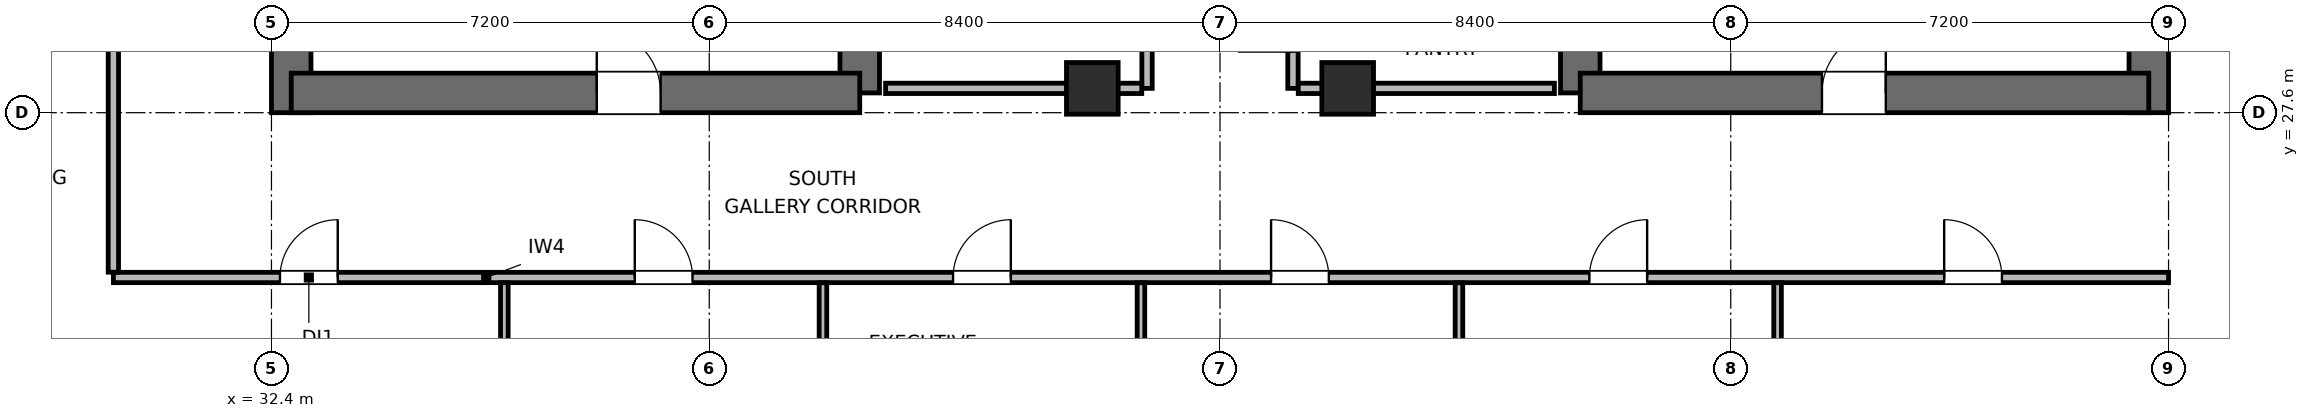
"""IFC4 building model, lengths in metres.
Left out: names, types, materials, properties, quantities, classifications, styles, units other than length and angle.
Written with IfcOpenShell. Run it as: python <this file> out.ifc"""

import sys

from ifc_helpers import new_model, si_unit, direction, frame, frame_2d, origin, origin_2d, place, context, subcontext, project, spatial, rectangle, extrude, element, fill, save


model = new_model("IFC4")
c1 = context("Model", 3, precision=1e-05, world=origin(), true_north=direction((0.0, 1.0)))
c2 = subcontext(c1, "Body", "Model", "MODEL_VIEW")
j1 = project(units=[si_unit("LENGTHUNIT", "METRE"), si_unit("PLANEANGLEUNIT", "RADIAN")], contexts=[c1])
p1 = place(None, origin())
s1 = spatial("IfcSite", under=j1, at=p1, CompositionType="ELEMENT")
p2 = place(p1, origin())
s2 = spatial("IfcBuilding", under=s1, at=p2, CompositionType="ELEMENT")
p3 = place(p2, frame((0.0, 0.0, 214.8)))
s3 = spatial("IfcBuildingStorey", under=s2, at=p3, CompositionType="ELEMENT", Elevation=214.8)
p4 = place(p3, frame((32.725, 27.6, 0.0), z_axis=(0.0, 0.0, 1.0), x_axis=(0.0, 1.0, 0.0)))
e1 = element("IfcWall", 1, at=p4, inside=s3, PredefinedType="SHEAR", context=c2, shape_type="SweptSolid", body=[
    extrude(rectangle(XDim=16.8, YDim=0.65, at=frame_2d((8.4, 0.0))), origin(), (0.0, 0.0, 1.0), 4.5),
])
p5 = place(p3, frame((42.075, 27.925, 0.0), z_axis=(0.0, 0.0, 1.0), x_axis=(0.0, 1.0, 0.0)))
e2 = element("IfcWall", 2, at=p5, inside=s3, PredefinedType="SHEAR", context=c2, shape_type="SweptSolid", body=[
    extrude(rectangle(XDim=6.475, YDim=0.65, at=frame_2d((3.237, 0.0))), origin(), (0.0, 0.0, 1.0), 4.5),
])
p6 = place(p3, frame((32.725, 27.925, 0.0), z_axis=(0.0, 0.0, 1.0), x_axis=(1.0, 0.0, 0.0)))
e3 = element("IfcWall", 3, at=p6, inside=s3, PredefinedType="SHEAR", context=c2, shape_type="SweptSolid", body=[
    extrude(rectangle(XDim=9.35, YDim=0.65, at=frame_2d((4.675, 0.0))), origin(), (0.0, 0.0, 1.0), 4.5),
])
p7 = place(p6, frame((5.025, 0.0, 0.0)))
e4 = element("IfcOpeningElement", 4, at=p7, cuts=e3, PredefinedType="OPENING", context=c2, shape_type="SweptSolid", body=[
    extrude(rectangle(XDim=1.05, YDim=2.04, at=frame_2d((0.525, 1.02))), frame((0.0, 0.335, 0.0), z_axis=(0.0, -1.0, 0.0), x_axis=(1.0, 0.0, 0.0)), (0.0, 0.0, 1.0), 0.67),
])
p8 = place(p3, frame((53.925, 27.925, 0.0), z_axis=(0.0, 0.0, 1.0), x_axis=(0.0, 1.0, 0.0)))
e5 = element("IfcWall", 5, at=p8, inside=s3, PredefinedType="SHEAR", context=c2, shape_type="SweptSolid", body=[
    extrude(rectangle(XDim=7.875, YDim=0.65, at=frame_2d((3.938, 0.0))), origin(), (0.0, 0.0, 1.0), 4.5),
])
p9 = place(p3, frame((63.275, 27.6, 0.0), z_axis=(0.0, 0.0, 1.0), x_axis=(0.0, 1.0, 0.0)))
e6 = element("IfcWall", 6, at=p9, inside=s3, PredefinedType="SHEAR", context=c2, shape_type="SweptSolid", body=[
    extrude(rectangle(XDim=16.8, YDim=0.65, at=frame_2d((8.4, 0.0))), origin(), (0.0, 0.0, 1.0), 4.5),
])
p10 = place(p3, frame((53.925, 27.925, 0.0), z_axis=(0.0, 0.0, 1.0), x_axis=(1.0, 0.0, 0.0)))
e7 = element("IfcWall", 7, at=p10, inside=s3, PredefinedType="SHEAR", context=c2, shape_type="SweptSolid", body=[
    extrude(rectangle(XDim=9.35, YDim=0.65, at=frame_2d((4.675, 0.0))), origin(), (0.0, 0.0, 1.0), 4.5),
])
p11 = place(p10, frame((3.975, 0.0, 0.0)))
e8 = element("IfcOpeningElement", 8, at=p11, cuts=e7, PredefinedType="OPENING", context=c2, shape_type="SweptSolid", body=[
    extrude(rectangle(XDim=1.05, YDim=2.04, at=frame_2d((0.525, 1.02))), frame((0.0, 0.335, 0.0), z_axis=(0.0, -1.0, 0.0), x_axis=(1.0, 0.0, 0.0)), (0.0, 0.0, 1.0), 0.67),
])
for number, where, z_axis, x_axis in (
    (9, (45.9, 28.0, 0.0), (0.0, 0.0, 1.0), (1.0, 0.0, 0.0)),
    (10, (50.1, 28.0, 0.0), (0.0, 0.0, 1.0), (1.0, 0.0, 0.0)),
):
    element("IfcColumn", number, at=place(p3, frame(where, z_axis=z_axis, x_axis=x_axis)), inside=s3, PredefinedType="COLUMN", context=c2, shape_type="SweptSolid", body=[
        extrude(rectangle(XDim=0.85, YDim=0.85, at=origin_2d()), origin(), (0.0, 0.0, 1.0), 4.5),
    ])
p12 = place(p3, frame((46.8, 28.0, 0.0), z_axis=(0.0, 0.0, 1.0), x_axis=(0.0, 1.0, 0.0)))
e11 = element("IfcWall", 11, at=p12, inside=s3, PredefinedType="PARTITIONING", context=c2, shape_type="SweptSolid", body=[
    extrude(rectangle(XDim=4.5, YDim=0.17, at=frame_2d((2.25, 0.0))), origin(), (0.0, 0.0, 1.0), 4.28),
])
p13 = place(p12, frame((1.8, 0.0, 0.0)))
e12 = element("IfcOpeningElement", 12, at=p13, cuts=e11, PredefinedType="OPENING", context=c2, shape_type="SweptSolid", body=[
    extrude(rectangle(XDim=0.9, YDim=2.02, at=frame_2d((0.45, 1.01))), frame((0.0, 0.095, 0.0), z_axis=(0.0, -1.0, 0.0), x_axis=(1.0, 0.0, 0.0)), (0.0, 0.0, 1.0), 0.19),
])
p14 = place(p3, frame((42.5, 28.0, 0.0), z_axis=(0.0, 0.0, 1.0), x_axis=(1.0, 0.0, 0.0)))
e13 = element("IfcWall", 13, at=p14, inside=s3, PredefinedType="PARTITIONING", context=c2, shape_type="SweptSolid", body=[
    extrude(rectangle(XDim=4.213, YDim=0.17, at=frame_2d((2.106, 0.0))), origin(), (0.0, 0.0, 1.0), 3.365),
])
p15 = place(p3, frame((49.2, 28.0, 0.0), z_axis=(0.0, 0.0, 1.0), x_axis=(0.0, 1.0, 0.0)))
e14 = element("IfcWall", 14, at=p15, inside=s3, PredefinedType="PARTITIONING", context=c2, shape_type="SweptSolid", body=[
    extrude(rectangle(XDim=4.5, YDim=0.17, at=frame_2d((2.25, 0.0))), origin(), (0.0, 0.0, 1.0), 4.28),
])
p16 = place(p15, frame((0.605, 0.0, 0.0)))
e15 = element("IfcOpeningElement", 15, at=p16, cuts=e14, PredefinedType="OPENING", context=c2, shape_type="SweptSolid", body=[
    extrude(rectangle(XDim=0.9, YDim=2.02, at=frame_2d((0.45, 1.01))), frame((0.0, 0.095, 0.0), z_axis=(0.0, -1.0, 0.0), x_axis=(1.0, 0.0, 0.0)), (0.0, 0.0, 1.0), 0.19),
])
p17 = place(p15, frame((2.655, 0.0, 0.0)))
e16 = element("IfcOpeningElement", 16, at=p17, cuts=e14, PredefinedType="OPENING", context=c2, shape_type="SweptSolid", body=[
    extrude(rectangle(XDim=0.9, YDim=2.02, at=frame_2d((0.45, 1.01))), frame((0.0, 0.095, 0.0), z_axis=(0.0, -1.0, 0.0), x_axis=(1.0, 0.0, 0.0)), (0.0, 0.0, 1.0), 0.19),
])
p18 = place(p3, frame((49.287, 28.0, 0.0), z_axis=(0.0, 0.0, 1.0), x_axis=(1.0, 0.0, 0.0)))
e17 = element("IfcWall", 17, at=p18, inside=s3, PredefinedType="PARTITIONING", context=c2, shape_type="SweptSolid", body=[
    extrude(rectangle(XDim=4.213, YDim=0.17, at=frame_2d((2.106, 0.0))), origin(), (0.0, 0.0, 1.0), 3.365),
])
p19 = place(p3, frame((29.8, 24.89, 0.0), z_axis=(0.0, 0.0, 1.0), x_axis=(1.0, 0.0, 0.0)))
e18 = element("IfcWall", 18, at=p19, inside=s3, PredefinedType="PARTITIONING", context=c2, shape_type="SweptSolid", body=[
    extrude(rectangle(XDim=33.8, YDim=0.17, at=frame_2d((16.9, 0.0))), origin(), (0.0, 0.0, 1.0), 4.28),
])
p20 = place(p19, frame((2.74, 0.0, 0.0)))
e19 = element("IfcOpeningElement", 19, at=p20, cuts=e18, PredefinedType="OPENING", context=c2, shape_type="SweptSolid", body=[
    extrude(rectangle(XDim=0.95, YDim=2.04, at=frame_2d((0.475, 1.02))), frame((0.0, 0.095, 0.0), z_axis=(0.0, -1.0, 0.0), x_axis=(1.0, 0.0, 0.0)), (0.0, 0.0, 1.0), 0.19),
])
p21 = place(p19, frame((8.575, 0.0, 0.0)))
e20 = element("IfcOpeningElement", 20, at=p21, cuts=e18, PredefinedType="OPENING", context=c2, shape_type="SweptSolid", body=[
    extrude(rectangle(XDim=0.95, YDim=2.04, at=frame_2d((0.475, 1.02))), frame((0.0, 0.095, 0.0), z_axis=(0.0, -1.0, 0.0), x_axis=(1.0, 0.0, 0.0)), (0.0, 0.0, 1.0), 0.19),
])
p22 = place(p19, frame((13.81, 0.0, 0.0)))
e21 = element("IfcOpeningElement", 21, at=p22, cuts=e18, PredefinedType="OPENING", context=c2, shape_type="SweptSolid", body=[
    extrude(rectangle(XDim=0.95, YDim=2.04, at=frame_2d((0.475, 1.02))), frame((0.0, 0.095, 0.0), z_axis=(0.0, -1.0, 0.0), x_axis=(1.0, 0.0, 0.0)), (0.0, 0.0, 1.0), 0.19),
])
p23 = place(p19, frame((19.04, 0.0, 0.0)))
e22 = element("IfcOpeningElement", 22, at=p23, cuts=e18, PredefinedType="OPENING", context=c2, shape_type="SweptSolid", body=[
    extrude(rectangle(XDim=0.95, YDim=2.04, at=frame_2d((0.475, 1.02))), frame((0.0, 0.095, 0.0), z_axis=(0.0, -1.0, 0.0), x_axis=(1.0, 0.0, 0.0)), (0.0, 0.0, 1.0), 0.19),
])
p24 = place(p19, frame((24.275, 0.0, 0.0)))
e23 = element("IfcOpeningElement", 23, at=p24, cuts=e18, PredefinedType="OPENING", context=c2, shape_type="SweptSolid", body=[
    extrude(rectangle(XDim=0.95, YDim=2.04, at=frame_2d((0.475, 1.02))), frame((0.0, 0.095, 0.0), z_axis=(0.0, -1.0, 0.0), x_axis=(1.0, 0.0, 0.0)), (0.0, 0.0, 1.0), 0.19),
])
p25 = place(p19, frame((30.11, 0.0, 0.0)))
e24 = element("IfcOpeningElement", 24, at=p25, cuts=e18, PredefinedType="OPENING", context=c2, shape_type="SweptSolid", body=[
    extrude(rectangle(XDim=0.95, YDim=2.04, at=frame_2d((0.475, 1.02))), frame((0.0, 0.095, 0.0), z_axis=(0.0, -1.0, 0.0), x_axis=(1.0, 0.0, 0.0)), (0.0, 0.0, 1.0), 0.19),
])
p26 = place(p3, frame((29.8, 24.977, 0.0), z_axis=(0.0, 0.0, 1.0), x_axis=(0.0, 1.0, 0.0)))
e25 = element("IfcWall", 25, at=p26, inside=s3, PredefinedType="PARTITIONING", context=c2, shape_type="SweptSolid", body=[
    extrude(rectangle(XDim=22.046, YDim=0.17, at=frame_2d((11.023, 0.0))), origin(), (0.0, 0.0, 1.0), 4.28),
])
p27 = place(p26, frame((4.593, 0.0, 0.0)))
e26 = element("IfcOpeningElement", 26, at=p27, cuts=e25, PredefinedType="OPENING", context=c2, shape_type="SweptSolid", body=[
    extrude(rectangle(XDim=0.95, YDim=2.04, at=frame_2d((0.475, 1.02))), frame((0.0, 0.095, 0.0), z_axis=(0.0, -1.0, 0.0), x_axis=(1.0, 0.0, 0.0)), (0.0, 0.0, 1.0), 0.19),
])
p28 = place(p26, frame((15.703, 0.0, 0.0)))
e27 = element("IfcOpeningElement", 27, at=p28, cuts=e25, PredefinedType="OPENING", context=c2, shape_type="SweptSolid", body=[
    extrude(rectangle(XDim=0.95, YDim=2.04, at=frame_2d((0.475, 1.02))), frame((0.0, 0.095, 0.0), z_axis=(0.0, -1.0, 0.0), x_axis=(1.0, 0.0, 0.0)), (0.0, 0.0, 1.0), 0.19),
])
p29 = place(p3, frame((36.23, 18.875, 0.0), z_axis=(0.0, 0.0, 1.0), x_axis=(0.0, 1.0, 0.0)))
e28 = element("IfcWall", 28, at=p29, inside=s3, PredefinedType="PARTITIONING", context=c2, shape_type="SweptSolid", body=[
    extrude(rectangle(XDim=5.928, YDim=0.125, at=frame_2d((2.964, 0.0))), origin(), (0.0, 0.0, 1.0), 4.28),
])
p30 = place(p3, frame((41.47, 18.952, 0.0), z_axis=(0.0, 0.0, 1.0), x_axis=(0.0, 1.0, 0.0)))
e29 = element("IfcWall", 29, at=p30, inside=s3, PredefinedType="PARTITIONING", context=c2, shape_type="SweptSolid", body=[
    extrude(rectangle(XDim=5.851, YDim=0.125, at=frame_2d((2.926, 0.0))), origin(), (0.0, 0.0, 1.0), 3.643),
])
p31 = place(p3, frame((46.7, 22.355, 0.0), z_axis=(0.0, 0.0, 1.0), x_axis=(0.0, 1.0, 0.0)))
e30 = element("IfcWall", 30, at=p31, inside=s3, PredefinedType="PARTITIONING", context=c2, shape_type="SweptSolid", body=[
    extrude(rectangle(XDim=2.448, YDim=0.125, at=frame_2d((1.224, 0.0))), origin(), (0.0, 0.0, 1.0), 4.28),
])
p32 = place(p3, frame((51.93, 20.275, 0.0), z_axis=(0.0, 0.0, 1.0), x_axis=(0.0, 1.0, 0.0)))
e31 = element("IfcWall", 31, at=p32, inside=s3, PredefinedType="PARTITIONING", context=c2, shape_type="SweptSolid", body=[
    extrude(rectangle(XDim=4.528, YDim=0.125, at=frame_2d((2.264, 0.0))), origin(), (0.0, 0.0, 1.0), 4.28),
])
p33 = place(p3, frame((57.17, 18.875, 0.0), z_axis=(0.0, 0.0, 1.0), x_axis=(0.0, 1.0, 0.0)))
e32 = element("IfcWall", 32, at=p33, inside=s3, PredefinedType="PARTITIONING", context=c2, shape_type="SweptSolid", body=[
    extrude(rectangle(XDim=5.928, YDim=0.125, at=frame_2d((2.964, 0.0))), origin(), (0.0, 0.0, 1.0), 4.28),
])
p34 = place(p7, origin())
e33 = element("IfcDoor", 33, at=p34, inside=s3, OperationType="SINGLE_SWING_LEFT", PredefinedType="DOOR", context=c2, shape_type="SweptSolid", body=[
    extrude(rectangle(XDim=1.05, YDim=2.04, at=frame_2d((0.525, 1.02))), frame((0.0, 0.025, 0.0), z_axis=(0.0, -1.0, 0.0), x_axis=(1.0, 0.0, 0.0)), (0.0, 0.0, 1.0), 0.05),
])
fill(e4, e33)
p35 = place(p11, origin())
e34 = element("IfcDoor", 34, at=p35, inside=s3, OperationType="SINGLE_SWING_RIGHT", PredefinedType="DOOR", context=c2, shape_type="SweptSolid", body=[
    extrude(rectangle(XDim=1.05, YDim=2.04, at=frame_2d((0.525, 1.02))), frame((0.0, 0.025, 0.0), z_axis=(0.0, -1.0, 0.0), x_axis=(1.0, 0.0, 0.0)), (0.0, 0.0, 1.0), 0.05),
])
fill(e8, e34)
p36 = place(p20, origin())
e35 = element("IfcDoor", 35, at=p36, inside=s3, OperationType="SINGLE_SWING_RIGHT", PredefinedType="DOOR", context=c2, shape_type="SweptSolid", body=[
    extrude(rectangle(XDim=0.95, YDim=2.04, at=frame_2d((0.475, 1.02))), frame((0.0, 0.025, 0.0), z_axis=(0.0, -1.0, 0.0), x_axis=(1.0, 0.0, 0.0)), (0.0, 0.0, 1.0), 0.05),
])
fill(e19, e35)
p37 = place(p21, origin())
e36 = element("IfcDoor", 36, at=p37, inside=s3, OperationType="SINGLE_SWING_LEFT", PredefinedType="DOOR", context=c2, shape_type="SweptSolid", body=[
    extrude(rectangle(XDim=0.95, YDim=2.04, at=frame_2d((0.475, 1.02))), frame((0.0, 0.025, 0.0), z_axis=(0.0, -1.0, 0.0), x_axis=(1.0, 0.0, 0.0)), (0.0, 0.0, 1.0), 0.05),
])
fill(e20, e36)
p38 = place(p22, origin())
e37 = element("IfcDoor", 37, at=p38, inside=s3, OperationType="SINGLE_SWING_RIGHT", PredefinedType="DOOR", context=c2, shape_type="SweptSolid", body=[
    extrude(rectangle(XDim=0.95, YDim=2.04, at=frame_2d((0.475, 1.02))), frame((0.0, 0.025, 0.0), z_axis=(0.0, -1.0, 0.0), x_axis=(1.0, 0.0, 0.0)), (0.0, 0.0, 1.0), 0.05),
])
fill(e21, e37)
p39 = place(p23, origin())
e38 = element("IfcDoor", 38, at=p39, inside=s3, OperationType="SINGLE_SWING_LEFT", PredefinedType="DOOR", context=c2, shape_type="SweptSolid", body=[
    extrude(rectangle(XDim=0.95, YDim=2.04, at=frame_2d((0.475, 1.02))), frame((0.0, 0.025, 0.0), z_axis=(0.0, -1.0, 0.0), x_axis=(1.0, 0.0, 0.0)), (0.0, 0.0, 1.0), 0.05),
])
fill(e22, e38)
p40 = place(p24, origin())
e39 = element("IfcDoor", 39, at=p40, inside=s3, OperationType="SINGLE_SWING_RIGHT", PredefinedType="DOOR", context=c2, shape_type="SweptSolid", body=[
    extrude(rectangle(XDim=0.95, YDim=2.04, at=frame_2d((0.475, 1.02))), frame((0.0, 0.025, 0.0), z_axis=(0.0, -1.0, 0.0), x_axis=(1.0, 0.0, 0.0)), (0.0, 0.0, 1.0), 0.05),
])
fill(e23, e39)
p41 = place(p25, origin())
e40 = element("IfcDoor", 40, at=p41, inside=s3, OperationType="SINGLE_SWING_LEFT", PredefinedType="DOOR", context=c2, shape_type="SweptSolid", body=[
    extrude(rectangle(XDim=0.95, YDim=2.04, at=frame_2d((0.475, 1.02))), frame((0.0, 0.025, 0.0), z_axis=(0.0, -1.0, 0.0), x_axis=(1.0, 0.0, 0.0)), (0.0, 0.0, 1.0), 0.05),
])
fill(e24, e40)
save(model, sys.argv[1])
